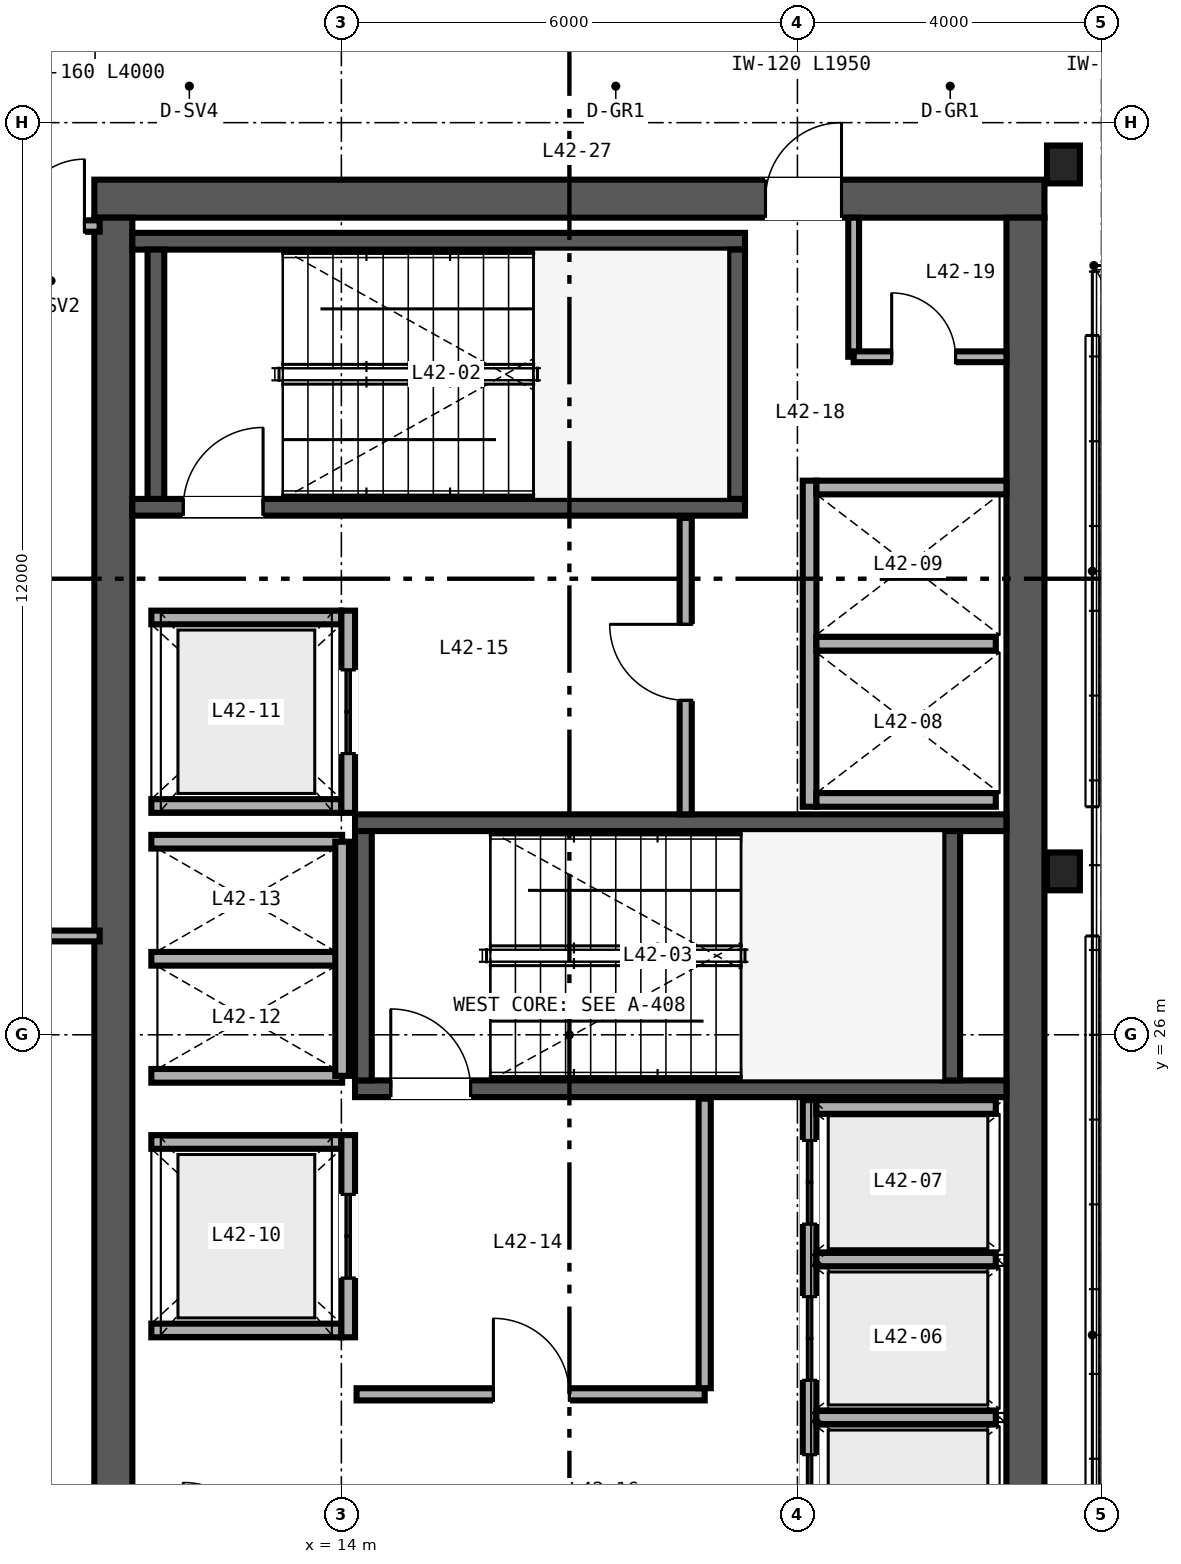
"""IFC4 building model, lengths in metres.
Left out: names, types, materials, properties, quantities, classifications, styles, units other than length and angle.
Written with IfcOpenShell. Run it as: python <this file> out.ifc"""

import sys

from ifc_helpers import new_model, si_unit, direction, frame, frame_2d, origin, origin_2d, place, context, subcontext, project, spatial, rectangle, i_section, extrude, source, transform, mapped, element, fill, save


model = new_model("IFC4")
c1 = context("Model", 3, precision=1e-05, world=origin(), true_north=direction((0.0, 1.0)))
c2 = subcontext(c1, "Body", "Model", "MODEL_VIEW")
j1 = project(units=[si_unit("LENGTHUNIT", "METRE"), si_unit("PLANEANGLEUNIT", "RADIAN")], contexts=[c1])
p1 = place(None, origin())
s1 = spatial("IfcSite", under=j1, at=p1, CompositionType="ELEMENT")
p2 = place(p1, origin())
s2 = spatial("IfcBuilding", under=s1, at=p2, CompositionType="ELEMENT")
p3 = place(p2, frame((0.0, 0.0, 170.4)))
s3 = spatial("IfcBuildingStorey", under=s2, at=p3, CompositionType="ELEMENT", Elevation=170.4)
p4 = place(p3, frame((10.75, 37.0, 0.0), z_axis=(0.0, 0.0, 1.0), x_axis=(1.0, 0.0, 0.0)))
e1 = element("IfcWall", 1, at=p4, inside=s3, PredefinedType="SHEAR", context=c2, shape_type="SweptSolid", body=[
    extrude(rectangle(XDim=12.5, YDim=0.5, at=frame_2d((6.25, 0.0))), origin(), (0.0, 0.0, 1.0), 3.37),
])
p5 = place(p4, frame((8.83, 0.0, 0.0)))
e2 = element("IfcOpeningElement", 2, at=p5, cuts=e1, PredefinedType="OPENING", context=c2, shape_type="SweptSolid", body=[
    extrude(rectangle(XDim=1.0, YDim=2.15, at=frame_2d((0.5, 1.075))), frame((0.0, 0.26, 0.0), z_axis=(0.0, -1.0, 0.0), x_axis=(1.0, 0.0, 0.0)), (0.0, 0.0, 1.0), 0.52),
])
for number, where, z_axis, x_axis in (
    (3, (11.0, 15.25, 0.0), (0.0, 0.0, 1.0), (0.0, 1.0, 0.0)),
    (4, (23.0, 15.25, 0.0), (0.0, 0.0, 1.0), (0.0, 1.0, 0.0)),
):
    element("IfcWall", number, at=place(p3, frame(where, z_axis=z_axis, x_axis=x_axis)), inside=s3, PredefinedType="SHEAR", context=c2, shape_type="SweptSolid", body=[
        extrude(rectangle(XDim=21.5, YDim=0.5, at=frame_2d((10.75, 0.0))), origin(), (0.0, 0.0, 1.0), 3.37),
    ])
p6 = place(p3, frame((11.25, 32.94, 0.0), z_axis=(0.0, 0.0, 1.0), x_axis=(1.0, 0.0, 0.0)))
e5 = element("IfcWall", 5, at=p6, inside=s3, PredefinedType="SHEAR", context=c2, shape_type="SweptSolid", body=[
    extrude(rectangle(XDim=8.06, YDim=0.22, at=frame_2d((4.03, 0.0))), origin(), (0.0, 0.0, 1.0), 3.4),
])
p7 = place(p6, frame((0.67, 0.0, 0.0)))
e6 = element("IfcOpeningElement", 6, at=p7, cuts=e5, PredefinedType="OPENING", context=c2, shape_type="SweptSolid", body=[
    extrude(rectangle(XDim=1.05, YDim=2.15, at=frame_2d((0.525, 1.075))), frame((0.0, 0.12, 0.0), z_axis=(0.0, -1.0, 0.0), x_axis=(1.0, 0.0, 0.0)), (0.0, 0.0, 1.0), 0.24),
])
p8 = place(p3, frame((11.25, 36.44, 0.0), z_axis=(0.0, 0.0, 1.0), x_axis=(1.0, 0.0, 0.0)))
e7 = element("IfcWall", 7, at=p8, inside=s3, PredefinedType="SHEAR", context=c2, shape_type="SweptSolid", body=[
    extrude(rectangle(XDim=8.06, YDim=0.22, at=frame_2d((4.03, 0.0))), origin(), (0.0, 0.0, 1.0), 3.4),
])
for number, where, z_axis, x_axis in (
    (8, (11.56, 33.05, 0.0), (0.0, 0.0, 1.0), (0.0, 1.0, 0.0)),
    (9, (19.2, 33.05, 0.0), (0.0, 0.0, 1.0), (0.0, 1.0, 0.0)),
):
    element("IfcWall", number, at=place(p3, frame(where, z_axis=z_axis, x_axis=x_axis)), inside=s3, PredefinedType="SHEAR", context=c2, shape_type="SweptSolid", body=[
        extrude(rectangle(XDim=3.28, YDim=0.22, at=frame_2d((1.64, 0.0))), origin(), (0.0, 0.0, 1.0), 3.4),
    ])
p9 = place(p3, frame((14.18, 25.29, 0.0), z_axis=(0.0, 0.0, 1.0), x_axis=(1.0, 0.0, 0.0)))
e10 = element("IfcWall", 10, at=p9, inside=s3, PredefinedType="SHEAR", context=c2, shape_type="SweptSolid", body=[
    extrude(rectangle(XDim=8.57, YDim=0.22, at=frame_2d((4.285, 0.0))), origin(), (0.0, 0.0, 1.0), 3.4),
])
p10 = place(p9, frame((0.47, 0.0, 0.0)))
e11 = element("IfcOpeningElement", 11, at=p10, cuts=e10, PredefinedType="OPENING", context=c2, shape_type="SweptSolid", body=[
    extrude(rectangle(XDim=1.05, YDim=2.15, at=frame_2d((0.525, 1.075))), frame((0.0, 0.12, 0.0), z_axis=(0.0, -1.0, 0.0), x_axis=(1.0, 0.0, 0.0)), (0.0, 0.0, 1.0), 0.24),
])
p11 = place(p3, frame((14.18, 28.79, 0.0), z_axis=(0.0, 0.0, 1.0), x_axis=(1.0, 0.0, 0.0)))
e12 = element("IfcWall", 12, at=p11, inside=s3, PredefinedType="SHEAR", context=c2, shape_type="SweptSolid", body=[
    extrude(rectangle(XDim=8.57, YDim=0.22, at=frame_2d((4.285, 0.0))), origin(), (0.0, 0.0, 1.0), 3.4),
])
for number, where, z_axis, x_axis in (
    (13, (14.29, 25.4, 0.0), (0.0, 0.0, 1.0), (0.0, 1.0, 0.0)),
    (14, (22.03, 25.4, 0.0), (0.0, 0.0, 1.0), (0.0, 1.0, 0.0)),
):
    element("IfcWall", number, at=place(p3, frame(where, z_axis=z_axis, x_axis=x_axis)), inside=s3, PredefinedType="SHEAR", context=c2, shape_type="SweptSolid", body=[
        extrude(rectangle(XDim=3.28, YDim=0.22, at=frame_2d((1.64, 0.0))), origin(), (0.0, 0.0, 1.0), 3.4),
    ])
m1 = source(origin(), c2, "Body", "SweptSolid", [
    extrude(i_section(OverallWidth=0.432, OverallDepth=0.498, WebThickness=0.056, FlangeThickness=0.089, FilletRadius=0.025, at=origin_2d()), origin(), (0.0, 0.0, 1.0), 3.37),
])
for number, where, z_axis, x_axis in (
    (15, (23.5, 28.15, 0.0), (0.0, 0.0, 1.0), (1.0, 0.0, 0.0)),
    (16, (23.5, 37.45, 0.0), (0.0, 0.0, 1.0), (1.0, 0.0, 0.0)),
):
    element("IfcColumn", number, at=place(p3, frame(where, z_axis=z_axis, x_axis=x_axis)), inside=s3, PredefinedType="COLUMN", context=c2, shape_type="MappedRepresentation", body=[
        mapped(m1, transform((0.0, 0.0, 0.0), scale=1.0)),
    ])
p12 = place(p3, frame((20.16, 18.82, 0.0), z_axis=(0.0, 0.0, 1.0), x_axis=(0.0, 1.0, 0.0)))
e17 = element("IfcWall", 17, at=p12, inside=s3, PredefinedType="SOLIDWALL", context=c2, shape_type="SweptSolid", body=[
    extrude(rectangle(XDim=6.32, YDim=0.18, at=frame_2d((3.16, 0.0))), origin(), (0.0, 0.0, 1.0), 2.47),
])
p13 = place(p12, frame((0.555, 0.0, 0.0)))
e18 = element("IfcOpeningElement", 18, at=p13, cuts=e17, PredefinedType="OPENING", context=c2, shape_type="SweptSolid", body=[
    extrude(rectangle(XDim=1.1, YDim=2.2, at=frame_2d((0.55, 1.1))), frame((0.0, 0.1, 0.0), z_axis=(0.0, -1.0, 0.0), x_axis=(1.0, 0.0, 0.0)), (0.0, 0.0, 1.0), 0.2),
])
p14 = place(p12, frame((2.635, 0.0, 0.0)))
e19 = element("IfcOpeningElement", 19, at=p14, cuts=e17, PredefinedType="OPENING", context=c2, shape_type="SweptSolid", body=[
    extrude(rectangle(XDim=1.1, YDim=2.2, at=frame_2d((0.55, 1.1))), frame((0.0, 0.1, 0.0), z_axis=(0.0, -1.0, 0.0), x_axis=(1.0, 0.0, 0.0)), (0.0, 0.0, 1.0), 0.2),
])
p15 = place(p12, frame((4.69, 0.0, 0.0)))
e20 = element("IfcOpeningElement", 20, at=p15, cuts=e17, PredefinedType="OPENING", context=c2, shape_type="SweptSolid", body=[
    extrude(rectangle(XDim=1.1, YDim=2.2, at=frame_2d((0.55, 1.1))), frame((0.0, 0.1, 0.0), z_axis=(0.0, -1.0, 0.0), x_axis=(1.0, 0.0, 0.0)), (0.0, 0.0, 1.0), 0.2),
])
p16 = place(p3, frame((20.25, 25.05, 0.0), z_axis=(0.0, 0.0, 1.0), x_axis=(1.0, 0.0, 0.0)))
e21 = element("IfcWall", 21, at=p16, inside=s3, PredefinedType="SOLIDWALL", context=c2, shape_type="SweptSolid", body=[
    extrude(rectangle(XDim=2.36, YDim=0.18, at=frame_2d((1.18, 0.0))), origin(), (0.0, 0.0, 1.0), 3.37),
])
p17 = place(p3, frame((20.25, 20.965, 0.0), z_axis=(0.0, 0.0, 1.0), x_axis=(1.0, 0.0, 0.0)))
e22 = element("IfcWall", 22, at=p17, inside=s3, PredefinedType="SOLIDWALL", context=c2, shape_type="SweptSolid", body=[
    extrude(rectangle(XDim=2.36, YDim=0.18, at=frame_2d((1.18, 0.0))), origin(), (0.0, 0.0, 1.0), 2.47),
])
p18 = place(p3, frame((20.25, 23.045, 0.0), z_axis=(0.0, 0.0, 1.0), x_axis=(1.0, 0.0, 0.0)))
e23 = element("IfcWall", 23, at=p18, inside=s3, PredefinedType="SOLIDWALL", context=c2, shape_type="SweptSolid", body=[
    extrude(rectangle(XDim=2.36, YDim=0.18, at=frame_2d((1.18, 0.0))), origin(), (0.0, 0.0, 1.0), 3.37),
])
p19 = place(p3, frame((20.16, 29.0, 0.0), z_axis=(0.0, 0.0, 1.0), x_axis=(0.0, 1.0, 0.0)))
e24 = element("IfcWall", 24, at=p19, inside=s3, PredefinedType="SOLIDWALL", context=c2, shape_type="SweptSolid", body=[
    extrude(rectangle(XDim=4.29, YDim=0.18, at=frame_2d((2.145, 0.0))), origin(), (0.0, 0.0, 1.0), 3.37),
])
p20 = place(p3, frame((20.25, 29.09, 0.0), z_axis=(0.0, 0.0, 1.0), x_axis=(1.0, 0.0, 0.0)))
e25 = element("IfcWall", 25, at=p20, inside=s3, PredefinedType="SOLIDWALL", context=c2, shape_type="SweptSolid", body=[
    extrude(rectangle(XDim=2.36, YDim=0.18, at=frame_2d((1.18, 0.0))), origin(), (0.0, 0.0, 1.0), 3.37),
])
p21 = place(p3, frame((20.25, 33.2, 0.0), z_axis=(0.0, 0.0, 1.0), x_axis=(1.0, 0.0, 0.0)))
e26 = element("IfcWall", 26, at=p21, inside=s3, PredefinedType="SOLIDWALL", context=c2, shape_type="SweptSolid", body=[
    extrude(rectangle(XDim=2.5, YDim=0.18, at=frame_2d((1.25, 0.0))), origin(), (0.0, 0.0, 1.0), 3.37),
])
p22 = place(p3, frame((20.25, 31.145, 0.0), z_axis=(0.0, 0.0, 1.0), x_axis=(1.0, 0.0, 0.0)))
e27 = element("IfcWall", 27, at=p22, inside=s3, PredefinedType="SOLIDWALL", context=c2, shape_type="SweptSolid", body=[
    extrude(rectangle(XDim=2.36, YDim=0.18, at=frame_2d((1.18, 0.0))), origin(), (0.0, 0.0, 1.0), 3.37),
])
for number, where, z_axis, x_axis in (
    (28, (11.5, 22.11, 0.0), (0.0, 0.0, 1.0), (1.0, 0.0, 0.0)),
    (29, (11.5, 24.59, 0.0), (0.0, 0.0, 1.0), (1.0, 0.0, 0.0)),
):
    element("IfcWall", number, at=place(p3, frame(where, z_axis=z_axis, x_axis=x_axis)), inside=s3, PredefinedType="SOLIDWALL", context=c2, shape_type="SweptSolid", body=[
        extrude(rectangle(XDim=2.5, YDim=0.18, at=frame_2d((1.25, 0.0))), origin(), (0.0, 0.0, 1.0), 3.37),
    ])
p23 = place(p3, frame((14.09, 22.02, 0.0), z_axis=(0.0, 0.0, 1.0), x_axis=(0.0, 1.0, 0.0)))
e30 = element("IfcWall", 30, at=p23, inside=s3, PredefinedType="SOLIDWALL", context=c2, shape_type="SweptSolid", body=[
    extrude(rectangle(XDim=2.66, YDim=0.18, at=frame_2d((1.33, 0.0))), origin(), (0.0, 0.0, 1.0), 3.37),
])
p24 = place(p23, frame((0.78, 0.0, 0.0)))
e31 = element("IfcOpeningElement", 31, at=p24, cuts=e30, PredefinedType="OPENING", context=c2, shape_type="SweptSolid", body=[
    extrude(rectangle(XDim=1.1, YDim=2.2, at=frame_2d((0.55, 1.1))), frame((0.0, 0.1, 0.0), z_axis=(0.0, -1.0, 0.0), x_axis=(1.0, 0.0, 0.0)), (0.0, 0.0, 1.0), 0.2),
])
for number, where, z_axis, x_axis in (
    (32, (11.5, 29.01, 0.0), (0.0, 0.0, 1.0), (1.0, 0.0, 0.0)),
    (33, (11.5, 31.49, 0.0), (0.0, 0.0, 1.0), (1.0, 0.0, 0.0)),
):
    element("IfcWall", number, at=place(p3, frame(where, z_axis=z_axis, x_axis=x_axis)), inside=s3, PredefinedType="SOLIDWALL", context=c2, shape_type="SweptSolid", body=[
        extrude(rectangle(XDim=2.5, YDim=0.18, at=frame_2d((1.25, 0.0))), origin(), (0.0, 0.0, 1.0), 3.37),
    ])
p25 = place(p3, frame((14.09, 28.92, 0.0), z_axis=(0.0, 0.0, 1.0), x_axis=(0.0, 1.0, 0.0)))
e34 = element("IfcWall", 34, at=p25, inside=s3, PredefinedType="SOLIDWALL", context=c2, shape_type="SweptSolid", body=[
    extrude(rectangle(XDim=2.66, YDim=0.18, at=frame_2d((1.33, 0.0))), origin(), (0.0, 0.0, 1.0), 3.37),
])
p26 = place(p25, frame((0.78, 0.0, 0.0)))
e35 = element("IfcOpeningElement", 35, at=p26, cuts=e34, PredefinedType="OPENING", context=c2, shape_type="SweptSolid", body=[
    extrude(rectangle(XDim=1.1, YDim=2.2, at=frame_2d((0.55, 1.1))), frame((0.0, 0.1, 0.0), z_axis=(0.0, -1.0, 0.0), x_axis=(1.0, 0.0, 0.0)), (0.0, 0.0, 1.0), 0.2),
])
for number, where, z_axis, x_axis in (
    (36, (11.5, 25.46, 0.0), (0.0, 0.0, 1.0), (1.0, 0.0, 0.0)),
    (37, (11.5, 27.0, 0.0), (0.0, 0.0, 1.0), (1.0, 0.0, 0.0)),
    (38, (11.5, 28.54, 0.0), (0.0, 0.0, 1.0), (1.0, 0.0, 0.0)),
):
    element("IfcWall", number, at=place(p3, frame(where, z_axis=z_axis, x_axis=x_axis)), inside=s3, PredefinedType="SOLIDWALL", context=c2, shape_type="SweptSolid", body=[
        extrude(rectangle(XDim=2.51, YDim=0.18, at=frame_2d((1.255, 0.0))), origin(), (0.0, 0.0, 1.0), 3.37),
    ])
p27 = place(p3, frame((14.01, 25.46, 0.0), z_axis=(0.0, 0.0, 1.0), x_axis=(0.0, 1.0, 0.0)))
e39 = element("IfcWall", 39, at=p27, inside=s3, PredefinedType="SOLIDWALL", context=c2, shape_type="SweptSolid", body=[
    extrude(rectangle(XDim=3.08, YDim=0.18, at=frame_2d((1.54, 0.0))), origin(), (0.0, 0.0, 1.0), 3.37),
])
p28 = place(p3, frame((14.2, 21.27, 0.0), z_axis=(0.0, 0.0, 1.0), x_axis=(1.0, 0.0, 0.0)))
e40 = element("IfcWall", 40, at=p28, inside=s3, PredefinedType="PARTITIONING", context=c2, shape_type="SweptSolid", body=[
    extrude(rectangle(XDim=4.58, YDim=0.16, at=frame_2d((2.29, 0.0))), origin(), (0.0, 0.0, 1.0), 3.37),
])
p29 = place(p28, frame((1.8, 0.0, 0.0)))
e41 = element("IfcOpeningElement", 41, at=p29, cuts=e40, PredefinedType="OPENING", context=c2, shape_type="SweptSolid", body=[
    extrude(rectangle(XDim=1.0, YDim=2.15, at=frame_2d((0.5, 1.075))), frame((0.0, 0.09, 0.0), z_axis=(0.0, -1.0, 0.0), x_axis=(1.0, 0.0, 0.0)), (0.0, 0.0, 1.0), 0.18),
])
p30 = place(p3, frame((18.78, 21.35, 0.0), z_axis=(0.0, 0.0, 1.0), x_axis=(0.0, 1.0, 0.0)))
e42 = element("IfcWall", 42, at=p30, inside=s3, PredefinedType="PARTITIONING", context=c2, shape_type="SweptSolid", body=[
    extrude(rectangle(XDim=3.81, YDim=0.16, at=frame_2d((1.905, 0.0))), origin(), (0.0, 0.0, 1.0), 3.37),
])
p31 = place(p3, frame((18.53, 28.9, 0.0), z_axis=(0.0, 0.0, 1.0), x_axis=(0.0, 1.0, 0.0)))
e43 = element("IfcWall", 43, at=p31, inside=s3, PredefinedType="PARTITIONING", context=c2, shape_type="SweptSolid", body=[
    extrude(rectangle(XDim=3.9, YDim=0.16, at=frame_2d((1.95, 0.0))), origin(), (0.0, 0.0, 1.0), 3.37),
])
p32 = place(p31, frame((1.5, 0.0, 0.0)))
e44 = element("IfcOpeningElement", 44, at=p32, cuts=e43, PredefinedType="OPENING", context=c2, shape_type="SweptSolid", body=[
    extrude(rectangle(XDim=1.0, YDim=2.15, at=frame_2d((0.5, 1.075))), frame((0.0, 0.09, 0.0), z_axis=(0.0, -1.0, 0.0), x_axis=(1.0, 0.0, 0.0)), (0.0, 0.0, 1.0), 0.18),
])
p33 = place(p3, frame((20.74, 34.92, 0.0), z_axis=(0.0, 0.0, 1.0), x_axis=(0.0, 1.0, 0.0)))
e45 = element("IfcWall", 45, at=p33, inside=s3, PredefinedType="PARTITIONING", context=c2, shape_type="SweptSolid", body=[
    extrude(rectangle(XDim=1.83, YDim=0.142, at=frame_2d((0.915, 0.0))), origin(), (0.0, 0.0, 1.0), 3.37),
])
p34 = place(p3, frame((20.74, 34.92, 0.0), z_axis=(0.0, 0.0, 1.0), x_axis=(1.0, 0.0, 0.0)))
e46 = element("IfcWall", 46, at=p34, inside=s3, PredefinedType="PARTITIONING", context=c2, shape_type="SweptSolid", body=[
    extrude(rectangle(XDim=2.01, YDim=0.142, at=frame_2d((1.005, 0.0))), origin(), (0.0, 0.0, 1.0), 3.37),
])
p35 = place(p34, frame((0.5, 0.0, 0.0)))
e47 = element("IfcOpeningElement", 47, at=p35, cuts=e46, PredefinedType="OPENING", context=c2, shape_type="SweptSolid", body=[
    extrude(rectangle(XDim=0.84, YDim=2.1, at=frame_2d((0.42, 1.05))), frame((0.0, 0.081, 0.0), z_axis=(0.0, -1.0, 0.0), x_axis=(1.0, 0.0, 0.0)), (0.0, 0.0, 1.0), 0.162),
])
p36 = place(p3, frame((8.16, 36.64, 0.0), z_axis=(0.0, 0.0, 1.0), x_axis=(1.0, 0.0, 0.0)))
e48 = element("IfcWall", 48, at=p36, inside=s3, PredefinedType="PARTITIONING", context=c2, shape_type="SweptSolid", body=[
    extrude(rectangle(XDim=2.66, YDim=0.15, at=frame_2d((1.33, 0.0))), origin(), (0.0, 0.0, 1.0), 2.753),
])
p37 = place(p36, frame((1.58, 0.0, 0.0)))
e49 = element("IfcOpeningElement", 49, at=p37, cuts=e48, PredefinedType="OPENING", context=c2, shape_type="SweptSolid", body=[
    extrude(rectangle(XDim=0.88, YDim=2.15, at=frame_2d((0.44, 1.075))), frame((0.0, 0.085, 0.0), z_axis=(0.0, -1.0, 0.0), x_axis=(1.0, 0.0, 0.0)), (0.0, 0.0, 1.0), 0.17),
])
p38 = place(p3, frame((8.16, 27.3, 0.0), z_axis=(0.0, 0.0, 1.0), x_axis=(1.0, 0.0, 0.0)))
e50 = element("IfcWall", 50, at=p38, inside=s3, PredefinedType="PARTITIONING", context=c2, shape_type="SweptSolid", body=[
    extrude(rectangle(XDim=2.66, YDim=0.142, at=frame_2d((1.33, 0.0))), origin(), (0.0, 0.0, 1.0), 2.591),
])
m2 = source(origin(), c2, "Body", "SweptSolid", [
    extrude(rectangle(XDim=1.05, YDim=2.15, at=frame_2d((0.525, 1.075))), frame((0.0, 0.025, 0.0), z_axis=(0.0, -1.0, 0.0), x_axis=(1.0, 0.0, 0.0)), (0.0, 0.0, 1.0), 0.05),
])
p39 = place(p7, origin())
e51 = element("IfcDoor", 51, at=p39, inside=s3, OperationType="SINGLE_SWING_RIGHT", PredefinedType="DOOR", context=c2, shape_type="MappedRepresentation", body=[
    mapped(m2, transform((0.0, 0.0, 0.0), scale=1.0)),
])
fill(e6, e51)
p40 = place(p10, origin())
e52 = element("IfcDoor", 52, at=p40, inside=s3, OperationType="SINGLE_SWING_LEFT", PredefinedType="DOOR", context=c2, shape_type="MappedRepresentation", body=[
    mapped(m2, transform((0.0, 0.0, 0.0), scale=1.0)),
])
fill(e11, e52)
m3 = source(origin(), c2, "Body", "SweptSolid", [
    extrude(rectangle(XDim=1.1, YDim=2.2, at=frame_2d((0.55, 1.1))), frame((0.0, 0.025, 0.0), z_axis=(0.0, -1.0, 0.0), x_axis=(1.0, 0.0, 0.0)), (0.0, 0.0, 1.0), 0.05),
])
p41 = place(p13, origin())
e53 = element("IfcDoor", 53, at=p41, inside=s3, OperationType="DOUBLE_DOOR_SLIDING", PredefinedType="DOOR", context=c2, shape_type="MappedRepresentation", body=[
    mapped(m3, transform((0.0, 0.0, 0.0), scale=1.0)),
])
fill(e18, e53)
p42 = place(p14, origin())
e54 = element("IfcDoor", 54, at=p42, inside=s3, OperationType="DOUBLE_DOOR_SLIDING", PredefinedType="DOOR", context=c2, shape_type="MappedRepresentation", body=[
    mapped(m3, transform((0.0, 0.0, 0.0), scale=1.0)),
])
fill(e19, e54)
p43 = place(p15, origin())
e55 = element("IfcDoor", 55, at=p43, inside=s3, OperationType="DOUBLE_DOOR_SLIDING", PredefinedType="DOOR", context=c2, shape_type="MappedRepresentation", body=[
    mapped(m3, transform((0.0, 0.0, 0.0), scale=1.0)),
])
fill(e20, e55)
p44 = place(p24, origin())
e56 = element("IfcDoor", 56, at=p44, inside=s3, OperationType="DOUBLE_DOOR_SLIDING", PredefinedType="DOOR", context=c2, shape_type="MappedRepresentation", body=[
    mapped(m3, transform((0.0, 0.0, 0.0), scale=1.0)),
])
fill(e31, e56)
p45 = place(p26, origin())
e57 = element("IfcDoor", 57, at=p45, inside=s3, OperationType="DOUBLE_DOOR_SLIDING", PredefinedType="DOOR", context=c2, shape_type="MappedRepresentation", body=[
    mapped(m3, transform((0.0, 0.0, 0.0), scale=1.0)),
])
fill(e35, e57)
m4 = source(origin(), c2, "Body", "SweptSolid", [
    extrude(rectangle(XDim=1.0, YDim=2.15, at=frame_2d((0.5, 1.075))), frame((0.0, 0.025, 0.0), z_axis=(0.0, -1.0, 0.0), x_axis=(1.0, 0.0, 0.0)), (0.0, 0.0, 1.0), 0.05),
])
p46 = place(p29, origin())
e58 = element("IfcDoor", 58, at=p46, inside=s3, OperationType="SINGLE_SWING_LEFT", PredefinedType="DOOR", context=c2, shape_type="MappedRepresentation", body=[
    mapped(m4, transform((0.0, 0.0, 0.0), scale=1.0)),
])
fill(e41, e58)
p47 = place(p32, origin())
e59 = element("IfcDoor", 59, at=p47, inside=s3, OperationType="SINGLE_SWING_RIGHT", PredefinedType="DOOR", context=c2, shape_type="MappedRepresentation", body=[
    mapped(m4, transform((0.0, 0.0, 0.0), scale=1.0)),
])
fill(e44, e59)
m5 = source(origin(), c2, "Body", "SweptSolid", [
    extrude(rectangle(XDim=0.84, YDim=2.1, at=frame_2d((0.42, 1.05))), frame((0.0, 0.025, 0.0), z_axis=(0.0, -1.0, 0.0), x_axis=(1.0, 0.0, 0.0)), (0.0, 0.0, 1.0), 0.05),
])
p48 = place(p35, origin())
e60 = element("IfcDoor", 60, at=p48, inside=s3, OperationType="SINGLE_SWING_LEFT", PredefinedType="DOOR", context=c2, shape_type="MappedRepresentation", body=[
    mapped(m5, transform((0.0, 0.0, 0.0), scale=1.0)),
])
fill(e47, e60)
p49 = place(p5, origin())
e61 = element("IfcDoor", 61, at=p49, inside=s3, OperationType="SINGLE_SWING_RIGHT", PredefinedType="DOOR", context=c2, shape_type="MappedRepresentation", body=[
    mapped(m4, transform((0.0, 0.0, 0.0), scale=1.0)),
])
fill(e2, e61)
m6 = source(origin(), c2, "Body", "SweptSolid", [
    extrude(rectangle(XDim=0.88, YDim=2.15, at=frame_2d((0.44, 1.075))), frame((0.0, 0.025, 0.0), z_axis=(0.0, -1.0, 0.0), x_axis=(1.0, 0.0, 0.0)), (0.0, 0.0, 1.0), 0.05),
])
p50 = place(p37, origin())
e62 = element("IfcDoor", 62, at=p50, inside=s3, OperationType="SINGLE_SWING_RIGHT", PredefinedType="DOOR", context=c2, shape_type="MappedRepresentation", body=[
    mapped(m6, transform((0.0, 0.0, 0.0), scale=1.0)),
])
fill(e49, e62)
save(model, sys.argv[1])
